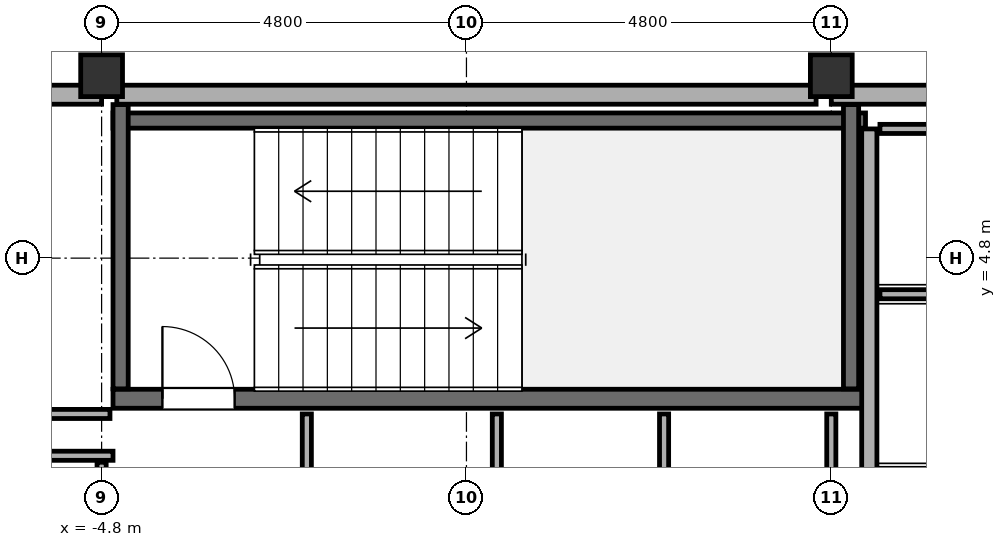
"""IFC4 building model, lengths in metres.
Left out: names, types, materials, properties, quantities, classifications, styles, units other than length and angle.
Written with IfcOpenShell. Run it as: python <this file> out.ifc"""

import sys

from ifc_helpers import new_model, si_unit, direction, frame, frame_2d, origin, origin_2d, place, context, subcontext, project, spatial, rectangle, hollow_rectangle, extrude, element, fill, save


model = new_model("IFC4")
c1 = context("Model", 3, precision=1e-05, world=origin(), true_north=direction((0.0, 1.0)))
c2 = subcontext(c1, "Body", "Model", "MODEL_VIEW")
j1 = project(units=[si_unit("LENGTHUNIT", "METRE"), si_unit("PLANEANGLEUNIT", "RADIAN")], contexts=[c1])
p1 = place(None, origin())
s1 = spatial("IfcSite", under=j1, at=p1, CompositionType="ELEMENT")
p2 = place(p1, origin())
s2 = spatial("IfcBuilding", under=s1, at=p2, CompositionType="ELEMENT")
p3 = place(p2, frame((0.0, 0.0, 282.2)))
s3 = spatial("IfcBuildingStorey", under=s2, at=p3, CompositionType="ELEMENT", Elevation=282.2)
for number, where, z_axis, x_axis in (
    (1, (-4.8, 7.2, 0.0), (0.0, 0.0, 1.0), (1.0, 0.0, 0.0)),
    (2, (4.8, 7.2, 0.0), (0.0, 0.0, 1.0), (1.0, 0.0, 0.0)),
):
    element("IfcColumn", number, at=place(p3, frame(where, z_axis=z_axis, x_axis=x_axis)), inside=s3, PredefinedType="COLUMN", context=c2, shape_type="SweptSolid", body=[
        extrude(hollow_rectangle(XDim=0.55, YDim=0.55, WallThickness=0.025, at=origin_2d()), origin(), (0.0, 0.0, 1.0), 4.2),
    ])
p4 = place(p3, frame((-14.2, 6.95, 0.0), z_axis=(0.0, 0.0, 1.0), x_axis=(1.0, 0.0, 0.0)))
e3 = element("IfcWall", 3, at=p4, inside=s3, PredefinedType="SOLIDWALL", context=c2, shape_type="SweptSolid", body=[
    extrude(rectangle(XDim=9.4, YDim=0.25, at=frame_2d((4.7, 0.0))), origin(), (0.0, 0.0, 1.0), 2.6),
])
p5 = place(p4, frame((4.9, 0.0, 0.0)))
e4 = element("IfcOpeningElement", 4, at=p5, cuts=e3, PredefinedType="OPENING", context=c2, shape_type="SweptSolid", body=[
    extrude(rectangle(XDim=1.0, YDim=2.15, at=frame_2d((0.5, 1.075))), frame((0.0, 0.14, 0.0), z_axis=(0.0, -1.0, 0.0), x_axis=(1.0, 0.0, 0.0)), (0.0, 0.0, 1.0), 0.28),
])
p6 = place(p3, frame((-4.6, 6.95, 0.0), z_axis=(0.0, 0.0, 1.0), x_axis=(1.0, 0.0, 0.0)))
e5 = element("IfcWall", 5, at=p6, inside=s3, PredefinedType="SOLIDWALL", context=c2, shape_type="SweptSolid", body=[
    extrude(rectangle(XDim=9.2, YDim=0.25, at=frame_2d((4.6, 0.0))), origin(), (0.0, 0.0, 1.0), 2.6),
])
p7 = place(p3, frame((4.8, 6.95, 0.0), z_axis=(0.0, 0.0, 1.0), x_axis=(1.0, 0.0, 0.0)))
e6 = element("IfcWall", 6, at=p7, inside=s3, PredefinedType="SOLIDWALL", context=c2, shape_type="SweptSolid", body=[
    extrude(rectangle(XDim=9.4, YDim=0.25, at=frame_2d((4.7, 0.0))), origin(), (0.0, 0.0, 1.0), 2.6),
])
p8 = place(p7, frame((3.5, 0.0, 0.0)))
e7 = element("IfcOpeningElement", 7, at=p8, cuts=e6, PredefinedType="OPENING", context=c2, shape_type="SweptSolid", body=[
    extrude(rectangle(XDim=1.2, YDim=2.2, at=frame_2d((0.6, 1.1))), frame((0.0, 0.14, 0.0), z_axis=(0.0, -1.0, 0.0), x_axis=(1.0, 0.0, 0.0)), (0.0, 0.0, 1.0), 0.28),
])
p9 = place(p3, frame((-4.65, 2.95, -0.2), z_axis=(0.0, 0.0, 1.0), x_axis=(1.0, 0.0, 0.0)))
e8 = element("IfcWall", 8, at=p9, inside=s3, PredefinedType="SOLIDWALL", context=c2, shape_type="SweptSolid", body=[
    extrude(rectangle(XDim=9.9, YDim=0.25, at=frame_2d((4.95, 0.0))), origin(), (0.0, 0.0, 1.0), 4.2),
])
p10 = place(p9, frame((0.65, 0.0, 0.2)))
e9 = element("IfcOpeningElement", 9, at=p10, cuts=e8, PredefinedType="OPENING", context=c2, shape_type="SweptSolid", body=[
    extrude(rectangle(XDim=0.95, YDim=2.15, at=frame_2d((0.475, 1.075))), frame((0.0, 0.14, 0.0), z_axis=(0.0, -1.0, 0.0), x_axis=(1.0, 0.0, 0.0)), (0.0, 0.0, 1.0), 0.28),
])
p11 = place(p3, frame((-4.65, 6.61, -0.2), z_axis=(0.0, 0.0, 1.0), x_axis=(1.0, 0.0, 0.0)))
e10 = element("IfcWall", 10, at=p11, inside=s3, PredefinedType="SOLIDWALL", context=c2, shape_type="SweptSolid", body=[
    extrude(rectangle(XDim=9.9, YDim=0.2, at=frame_2d((4.95, 0.0))), origin(), (0.0, 0.0, 1.0), 4.2),
])
for number, where, z_axis, x_axis in (
    (11, (-4.55, 3.08, -0.2), (0.0, 0.0, 1.0), (0.0, 1.0, 0.0)),
    (12, (5.06, 3.08, -0.2), (0.0, 0.0, 1.0), (0.0, 1.0, 0.0)),
):
    element("IfcWall", number, at=place(p3, frame(where, z_axis=z_axis, x_axis=x_axis)), inside=s3, PredefinedType="SOLIDWALL", context=c2, shape_type="SweptSolid", body=[
        extrude(rectangle(XDim=3.74, YDim=0.2, at=frame_2d((1.87, 0.0))), origin(), (0.0, 0.0, 1.0), 4.2),
    ])
p12 = place(p3, frame((5.3, -0.3, 0.0), z_axis=(0.0, 0.0, 1.0), x_axis=(0.0, 1.0, 0.0)))
e13 = element("IfcWall", 13, at=p12, inside=s3, PredefinedType="SOLIDWALL", context=c2, shape_type="SweptSolid", body=[
    extrude(rectangle(XDim=6.8, YDim=0.2, at=frame_2d((3.4, 0.0))), origin(), (0.0, 0.0, 1.0), 4.0),
])
for number, where, z_axis, x_axis in (
    (14, (5.44, 4.325, 0.0), (0.0, 0.0, 1.0), (1.0, 0.0, 0.0)),
    (15, (5.44, 6.5, 0.0), (0.0, 0.0, 1.0), (1.0, 0.0, 0.0)),
):
    element("IfcWall", number, at=place(p3, frame(where, z_axis=z_axis, x_axis=x_axis)), inside=s3, PredefinedType="PARTITIONING", context=c2, shape_type="SweptSolid", body=[
        extrude(rectangle(XDim=2.12, YDim=0.12, at=frame_2d((1.06, 0.0))), origin(), (0.0, 0.0, 1.0), 4.0),
    ])
p13 = place(p3, frame((-7.0, 2.2, 0.0), z_axis=(0.0, 0.0, 1.0), x_axis=(1.0, 0.0, 0.0)))
e16 = element("IfcWall", 16, at=p13, inside=s3, PredefinedType="PARTITIONING", context=c2, shape_type="SweptSolid", body=[
    extrude(rectangle(XDim=2.35, YDim=0.12, at=frame_2d((1.175, 0.0))), origin(), (0.0, 0.0, 1.0), 4.0),
])
p14 = place(p3, frame((-7.0, 2.75, 0.0), z_axis=(0.0, 0.0, 1.0), x_axis=(1.0, 0.0, 0.0)))
e17 = element("IfcWall", 17, at=p14, inside=s3, PredefinedType="PARTITIONING", context=c2, shape_type="SweptSolid", body=[
    extrude(rectangle(XDim=2.31, YDim=0.12, at=frame_2d((1.155, 0.0))), origin(), (0.0, 0.0, 1.0), 4.0),
])
p15 = place(p3, frame((-4.8, -6.415, 0.0), z_axis=(0.0, 0.0, 1.0), x_axis=(0.0, 1.0, 0.0)))
e18 = element("IfcWall", 18, at=p15, inside=s3, PredefinedType="PARTITIONING", context=c2, shape_type="SweptSolid", body=[
    extrude(rectangle(XDim=8.53, YDim=0.12, at=frame_2d((4.265, 0.0))), origin(), (0.0, 0.0, 1.0), 4.0),
])
p16 = place(p15, frame((3.965, 0.0, 0.0)))
e19 = element("IfcOpeningElement", 19, at=p16, cuts=e18, PredefinedType="OPENING", context=c2, shape_type="SweptSolid", body=[
    extrude(rectangle(XDim=0.9, YDim=2.1, at=frame_2d((0.45, 1.05))), frame((0.0, 0.075, 0.0), z_axis=(0.0, -1.0, 0.0), x_axis=(1.0, 0.0, 0.0)), (0.0, 0.0, 1.0), 0.15),
])
p17 = place(p3, frame((-2.1, -6.415, 0.0), z_axis=(0.0, 0.0, 1.0), x_axis=(0.0, 1.0, 0.0)))
e20 = element("IfcWall", 20, at=p17, inside=s3, PredefinedType="PARTITIONING", context=c2, shape_type="SweptSolid", body=[
    extrude(rectangle(XDim=9.165, YDim=0.12, at=frame_2d((4.583, 0.0))), origin(), (0.0, 0.0, 1.0), 4.0),
])
p18 = place(p17, frame((1.765, 0.0, 0.0)))
e21 = element("IfcOpeningElement", 21, at=p18, cuts=e20, PredefinedType="OPENING", context=c2, shape_type="SweptSolid", body=[
    extrude(rectangle(XDim=0.9, YDim=2.1, at=frame_2d((0.45, 1.05))), frame((0.0, 0.075, 0.0), z_axis=(0.0, -1.0, 0.0), x_axis=(1.0, 0.0, 0.0)), (0.0, 0.0, 1.0), 0.15),
])
p19 = place(p17, frame((6.565, 0.0, 0.0)))
e22 = element("IfcOpeningElement", 22, at=p19, cuts=e20, PredefinedType="OPENING", context=c2, shape_type="SweptSolid", body=[
    extrude(rectangle(XDim=0.9, YDim=2.1, at=frame_2d((0.45, 1.05))), frame((0.0, 0.075, 0.0), z_axis=(0.0, -1.0, 0.0), x_axis=(1.0, 0.0, 0.0)), (0.0, 0.0, 1.0), 0.15),
])
p20 = place(p3, frame((0.4, -6.415, 0.0), z_axis=(0.0, 0.0, 1.0), x_axis=(0.0, 1.0, 0.0)))
e23 = element("IfcWall", 23, at=p20, inside=s3, PredefinedType="PARTITIONING", context=c2, shape_type="SweptSolid", body=[
    extrude(rectangle(XDim=9.165, YDim=0.12, at=frame_2d((4.583, 0.0))), origin(), (0.0, 0.0, 1.0), 4.0),
])
p21 = place(p3, frame((2.6, 0.3, 0.0), z_axis=(0.0, 0.0, 1.0), x_axis=(0.0, 1.0, 0.0)))
e24 = element("IfcWall", 24, at=p21, inside=s3, PredefinedType="PARTITIONING", context=c2, shape_type="SweptSolid", body=[
    extrude(rectangle(XDim=2.45, YDim=0.12, at=frame_2d((1.225, 0.0))), origin(), (0.0, 0.0, 1.0), 4.0),
])
p22 = place(p21, frame((0.75, 0.0, 0.0)))
e25 = element("IfcOpeningElement", 25, at=p22, cuts=e24, PredefinedType="OPENING", context=c2, shape_type="SweptSolid", body=[
    extrude(rectangle(XDim=0.9, YDim=2.1, at=frame_2d((0.45, 1.05))), frame((0.0, 0.075, 0.0), z_axis=(0.0, -1.0, 0.0), x_axis=(1.0, 0.0, 0.0)), (0.0, 0.0, 1.0), 0.15),
])
p23 = place(p3, frame((4.8, 0.3, 0.0), z_axis=(0.0, 0.0, 1.0), x_axis=(0.0, 1.0, 0.0)))
e26 = element("IfcWall", 26, at=p23, inside=s3, PredefinedType="PARTITIONING", context=c2, shape_type="SweptSolid", body=[
    extrude(rectangle(XDim=2.45, YDim=0.12, at=frame_2d((1.225, 0.0))), origin(), (0.0, 0.0, 1.0), 4.0),
])
p24 = place(p10, origin())
e27 = element("IfcDoor", 27, at=p24, inside=s3, OperationType="SINGLE_SWING_RIGHT", PredefinedType="DOOR", context=c2, shape_type="SweptSolid", body=[
    extrude(rectangle(XDim=0.95, YDim=2.15, at=frame_2d((0.475, 1.075))), frame((0.0, 0.025, 0.0), z_axis=(0.0, -1.0, 0.0), x_axis=(1.0, 0.0, 0.0)), (0.0, 0.0, 1.0), 0.05),
])
fill(e9, e27)
save(model, sys.argv[1])
